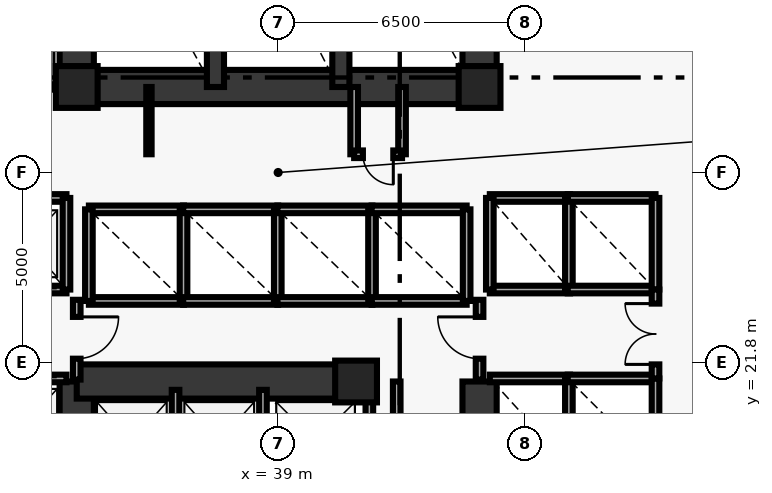
"""IFC4 building model, lengths in metres.
Left out: names, types, materials, properties, quantities, classifications, styles, units other than length and angle.
Written with IfcOpenShell. Run it as: python <this file> out.ifc"""

import sys

from ifc_helpers import new_model, si_unit, direction, frame, frame_2d, origin, origin_2d, place, context, subcontext, project, spatial, rectangle, extrude, element, fill, save


model = new_model("IFC4")
c1 = context("Model", 3, precision=1e-05, world=origin(), true_north=direction((0.0, 1.0)))
c2 = subcontext(c1, "Body", "Model", "MODEL_VIEW")
j1 = project(units=[si_unit("LENGTHUNIT", "METRE"), si_unit("PLANEANGLEUNIT", "RADIAN")], contexts=[c1])
p1 = place(None, origin())
s1 = spatial("IfcSite", under=j1, at=p1, CompositionType="ELEMENT")
p2 = place(p1, origin())
s2 = spatial("IfcBuilding", under=s1, at=p2, CompositionType="ELEMENT")
p3 = place(p2, frame((0.0, 0.0, 11.0)))
s3 = spatial("IfcBuildingStorey", under=s2, at=p3, CompositionType="ELEMENT", Elevation=11.0)
for number, where, z_axis, x_axis in (
    (1, (41.05, 21.3, 0.0), (0.0, 0.0, 1.0), (1.0, 0.0, 0.0)),
    (2, (44.3, 29.05, 0.0), (0.0, 0.0, 1.0), (1.0, 0.0, 0.0)),
    (3, (33.7, 29.05, 0.0), (0.0, 0.0, 1.0), (1.0, 0.0, 0.0)),
):
    element("IfcColumn", number, at=place(p3, frame(where, z_axis=z_axis, x_axis=x_axis)), inside=s3, PredefinedType="PILASTER", context=c2, shape_type="SweptSolid", body=[
        extrude(rectangle(XDim=1.1, YDim=1.1, at=origin_2d()), origin(), (0.0, 0.0, 1.0), 4.7),
    ])
p4 = place(p3, frame((33.7, 29.05, 0.0), z_axis=(0.0, 0.0, 1.0), x_axis=(0.0, 1.0, 0.0)))
e4 = element("IfcWall", 4, at=p4, inside=s3, PredefinedType="SHEAR", context=c2, shape_type="SweptSolid", body=[
    extrude(rectangle(XDim=8.35, YDim=0.9, at=frame_2d((4.175, 0.0))), origin(), (0.0, 0.0, 1.0), 4.7),
])
p5 = place(p3, frame((33.7, 18.35, 0.0), z_axis=(0.0, 0.0, 1.0), x_axis=(0.0, 1.0, 0.0)))
e5 = element("IfcWall", 5, at=p5, inside=s3, PredefinedType="SHEAR", context=c2, shape_type="SweptSolid", body=[
    extrude(rectangle(XDim=2.95, YDim=0.9, at=frame_2d((1.475, 0.0))), origin(), (0.0, 0.0, 1.0), 4.7),
])
p6 = place(p3, frame((44.3, 29.05, 0.0), z_axis=(0.0, 0.0, 1.0), x_axis=(0.0, 1.0, 0.0)))
e6 = element("IfcWall", 6, at=p6, inside=s3, PredefinedType="SHEAR", context=c2, shape_type="SweptSolid", body=[
    extrude(rectangle(XDim=8.35, YDim=0.9, at=frame_2d((4.175, 0.0))), origin(), (0.0, 0.0, 1.0), 4.7),
])
p7 = place(p3, frame((44.3, 18.35, 0.0), z_axis=(0.0, 0.0, 1.0), x_axis=(0.0, 1.0, 0.0)))
e7 = element("IfcWall", 7, at=p7, inside=s3, PredefinedType="SHEAR", context=c2, shape_type="SweptSolid", body=[
    extrude(rectangle(XDim=2.95, YDim=0.9, at=frame_2d((1.475, 0.0))), origin(), (0.0, 0.0, 1.0), 4.7),
])
p8 = place(p3, frame((33.7, 29.05, 0.0), z_axis=(0.0, 0.0, 1.0), x_axis=(1.0, 0.0, 0.0)))
e8 = element("IfcWall", 8, at=p8, inside=s3, PredefinedType="SHEAR", context=c2, shape_type="SweptSolid", body=[
    extrude(rectangle(XDim=10.6, YDim=0.9, at=frame_2d((5.3, 0.0))), origin(), (0.0, 0.0, 1.0), 4.7),
])
p9 = place(p3, frame((33.7, 21.3, 0.0), z_axis=(0.0, 0.0, 1.0), x_axis=(1.0, 0.0, 0.0)))
e9 = element("IfcWall", 9, at=p9, inside=s3, PredefinedType="SHEAR", context=c2, shape_type="SweptSolid", body=[
    extrude(rectangle(XDim=7.55, YDim=0.9, at=frame_2d((3.775, 0.0))), origin(), (0.0, 0.0, 1.0), 4.7),
])
for number, where, z_axis, x_axis in (
    (10, (37.35, 29.05, 0.0), (0.0, 0.0, 1.0), (0.0, 1.0, 0.0)),
    (11, (40.65, 29.05, 0.0), (0.0, 0.0, 1.0), (0.0, 1.0, 0.0)),
):
    element("IfcWall", number, at=place(p3, frame(where, z_axis=z_axis, x_axis=x_axis)), inside=s3, PredefinedType="SHEAR", context=c2, shape_type="SweptSolid", body=[
        extrude(rectangle(XDim=8.35, YDim=0.45, at=frame_2d((4.175, 0.0))), origin(), (0.0, 0.0, 1.0), 4.7),
    ])
p10 = place(p3, frame((35.6, 27.28, 0.0), z_axis=(0.0, 0.0, 1.0), x_axis=(0.0, 1.0, 0.0)))
e12 = element("IfcWall", 12, at=p10, inside=s3, PredefinedType="PARTITIONING", context=c2, shape_type="SweptSolid", body=[
    extrude(rectangle(XDim=1.77, YDim=0.14, at=frame_2d((0.885, 0.0))), origin(), (0.0, 0.0, 1.0), 4.7),
])
for number, where, z_axis, x_axis in (
    (13, (41.0, 27.28, 0.0), (0.0, 0.0, 1.0), (0.0, 1.0, 0.0)),
    (14, (42.26, 27.28, 0.0), (0.0, 0.0, 1.0), (0.0, 1.0, 0.0)),
):
    element("IfcWall", number, at=place(p3, frame(where, z_axis=z_axis, x_axis=x_axis)), inside=s3, PredefinedType="SOLIDWALL", context=c2, shape_type="SweptSolid", body=[
        extrude(rectangle(XDim=1.77, YDim=0.2, at=frame_2d((0.885, 0.0))), origin(), (0.0, 0.0, 1.0), 4.7),
    ])
p11 = place(p3, frame((41.0, 27.28, 0.0), z_axis=(0.0, 0.0, 1.0), x_axis=(1.0, 0.0, 0.0)))
e15 = element("IfcWall", 15, at=p11, inside=s3, PredefinedType="SOLIDWALL", context=c2, shape_type="SweptSolid", body=[
    extrude(rectangle(XDim=1.26, YDim=0.2, at=frame_2d((0.63, 0.0))), origin(), (0.0, 0.0, 1.0), 4.7),
])
p12 = place(p11, frame((0.23, 0.0, 0.0)))
e16 = element("IfcOpeningElement", 16, at=p12, cuts=e15, PredefinedType="OPENING", context=c2, shape_type="SweptSolid", body=[
    extrude(rectangle(XDim=0.8, YDim=2.05, at=frame_2d((0.4, 1.025))), frame((0.0, 0.11, 0.0), z_axis=(0.0, -1.0, 0.0), x_axis=(1.0, 0.0, 0.0)), (0.0, 0.0, 1.0), 0.22),
])
p13 = place(p3, frame((31.32, 23.72, 0.0), z_axis=(0.0, 0.0, 1.0), x_axis=(1.0, 0.0, 0.0)))
e17 = element("IfcWall", 17, at=p13, inside=s3, PredefinedType="SOLIDWALL", context=c2, shape_type="SweptSolid", body=[
    extrude(rectangle(XDim=2.11, YDim=0.2, at=frame_2d((1.055, 0.0))), origin(), (0.0, 0.0, 1.0), 4.7),
])
p14 = place(p13, frame((0.505, 0.0, 0.0)))
e18 = element("IfcOpeningElement", 18, at=p14, cuts=e17, PredefinedType="OPENING", context=c2, shape_type="SweptSolid", body=[
    extrude(rectangle(XDim=1.1, YDim=2.15, at=frame_2d((0.55, 1.075))), frame((0.0, 0.11, 0.0), z_axis=(0.0, -1.0, 0.0), x_axis=(1.0, 0.0, 0.0)), (0.0, 0.0, 1.0), 0.22),
])
p15 = place(p3, frame((31.32, 26.13, 0.0), z_axis=(0.0, 0.0, 1.0), x_axis=(1.0, 0.0, 0.0)))
e19 = element("IfcWall", 19, at=p15, inside=s3, PredefinedType="SOLIDWALL", context=c2, shape_type="SweptSolid", body=[
    extrude(rectangle(XDim=2.11, YDim=0.2, at=frame_2d((1.055, 0.0))), origin(), (0.0, 0.0, 1.0), 4.7),
])
p16 = place(p3, frame((33.43, 23.72, 0.0), z_axis=(0.0, 0.0, 1.0), x_axis=(0.0, 1.0, 0.0)))
e20 = element("IfcWall", 20, at=p16, inside=s3, PredefinedType="SOLIDWALL", context=c2, shape_type="SweptSolid", body=[
    extrude(rectangle(XDim=2.41, YDim=0.2, at=frame_2d((1.205, 0.0))), origin(), (0.0, 0.0, 1.0), 4.7),
])
p17 = place(p3, frame((31.32, 21.38, 0.0), z_axis=(0.0, 0.0, 1.0), x_axis=(1.0, 0.0, 0.0)))
e21 = element("IfcWall", 21, at=p17, inside=s3, PredefinedType="SOLIDWALL", context=c2, shape_type="SweptSolid", body=[
    extrude(rectangle(XDim=2.11, YDim=0.2, at=frame_2d((1.055, 0.0))), origin(), (0.0, 0.0, 1.0), 4.7),
])
p18 = place(p17, frame((0.505, 0.0, 0.0)))
e22 = element("IfcOpeningElement", 22, at=p18, cuts=e21, PredefinedType="OPENING", context=c2, shape_type="SweptSolid", body=[
    extrude(rectangle(XDim=1.1, YDim=2.15, at=frame_2d((0.55, 1.075))), frame((0.0, 0.11, 0.0), z_axis=(0.0, -1.0, 0.0), x_axis=(1.0, 0.0, 0.0)), (0.0, 0.0, 1.0), 0.22),
])
for number, where, z_axis, x_axis in (
    (23, (44.57, 23.72, 0.0), (0.0, 0.0, 1.0), (1.0, 0.0, 0.0)),
    (24, (44.57, 26.13, 0.0), (0.0, 0.0, 1.0), (1.0, 0.0, 0.0)),
):
    element("IfcWall", number, at=place(p3, frame(where, z_axis=z_axis, x_axis=x_axis)), inside=s3, PredefinedType="SOLIDWALL", context=c2, shape_type="SweptSolid", body=[
        extrude(rectangle(XDim=2.11, YDim=0.2, at=frame_2d((1.055, 0.0))), origin(), (0.0, 0.0, 1.0), 4.7),
    ])
for number, where, z_axis, x_axis in (
    (25, (44.57, 23.72, 0.0), (0.0, 0.0, 1.0), (0.0, 1.0, 0.0)),
    (26, (46.65, 23.72, 0.0), (0.0, 0.0, 1.0), (0.0, 1.0, 0.0)),
):
    element("IfcWall", number, at=place(p3, frame(where, z_axis=z_axis, x_axis=x_axis)), inside=s3, PredefinedType="SOLIDWALL", context=c2, shape_type="SweptSolid", body=[
        extrude(rectangle(XDim=2.41, YDim=0.2, at=frame_2d((1.205, 0.0))), origin(), (0.0, 0.0, 1.0), 4.7),
    ])
for number, where, z_axis, x_axis in (
    (27, (46.62, 23.72, 0.0), (0.0, 0.0, 1.0), (1.0, 0.0, 0.0)),
    (28, (46.62, 26.13, 0.0), (0.0, 0.0, 1.0), (1.0, 0.0, 0.0)),
):
    element("IfcWall", number, at=place(p3, frame(where, z_axis=z_axis, x_axis=x_axis)), inside=s3, PredefinedType="SOLIDWALL", context=c2, shape_type="SweptSolid", body=[
        extrude(rectangle(XDim=2.31, YDim=0.2, at=frame_2d((1.155, 0.0))), origin(), (0.0, 0.0, 1.0), 4.7),
    ])
p19 = place(p3, frame((48.93, 23.72, 0.0), z_axis=(0.0, 0.0, 1.0), x_axis=(0.0, 1.0, 0.0)))
e29 = element("IfcWall", 29, at=p19, inside=s3, PredefinedType="SOLIDWALL", context=c2, shape_type="SweptSolid", body=[
    extrude(rectangle(XDim=2.41, YDim=0.2, at=frame_2d((1.205, 0.0))), origin(), (0.0, 0.0, 1.0), 4.7),
])
p20 = place(p3, frame((44.57, 21.38, 0.0), z_axis=(0.0, 0.0, 1.0), x_axis=(1.0, 0.0, 0.0)))
e30 = element("IfcWall", 30, at=p20, inside=s3, PredefinedType="SOLIDWALL", context=c2, shape_type="SweptSolid", body=[
    extrude(rectangle(XDim=2.11, YDim=0.2, at=frame_2d((1.055, 0.0))), origin(), (0.0, 0.0, 1.0), 4.7),
])
for number, where, z_axis, x_axis in (
    (31, (46.65, 19.07, 0.0), (0.0, 0.0, 1.0), (0.0, 1.0, 0.0)),
    (32, (46.62, 21.38, 0.0), (0.0, 0.0, 1.0), (1.0, 0.0, 0.0)),
    (33, (48.93, 19.07, 0.0), (0.0, 0.0, 1.0), (0.0, 1.0, 0.0)),
):
    element("IfcWall", number, at=place(p3, frame(where, z_axis=z_axis, x_axis=x_axis)), inside=s3, PredefinedType="SOLIDWALL", context=c2, shape_type="SweptSolid", body=[
        extrude(rectangle(XDim=2.31, YDim=0.2, at=frame_2d((1.155, 0.0))), origin(), (0.0, 0.0, 1.0), 4.7),
    ])
for number, where, z_axis, x_axis in (
    (34, (34.02, 23.42, 0.0), (0.0, 0.0, 1.0), (1.0, 0.0, 0.0)),
    (35, (34.02, 25.83, 0.0), (0.0, 0.0, 1.0), (1.0, 0.0, 0.0)),
):
    element("IfcWall", number, at=place(p3, frame(where, z_axis=z_axis, x_axis=x_axis)), inside=s3, PredefinedType="SOLIDWALL", context=c2, shape_type="SweptSolid", body=[
        extrude(rectangle(XDim=2.5, YDim=0.2, at=frame_2d((1.25, 0.0))), origin(), (0.0, 0.0, 1.0), 4.7),
    ])
for number, where, z_axis, x_axis in (
    (36, (34.02, 23.42, 0.0), (0.0, 0.0, 1.0), (0.0, 1.0, 0.0)),
    (37, (36.51, 23.42, 0.0), (0.0, 0.0, 1.0), (0.0, 1.0, 0.0)),
):
    element("IfcWall", number, at=place(p3, frame(where, z_axis=z_axis, x_axis=x_axis)), inside=s3, PredefinedType="SOLIDWALL", context=c2, shape_type="SweptSolid", body=[
        extrude(rectangle(XDim=2.41, YDim=0.2, at=frame_2d((1.205, 0.0))), origin(), (0.0, 0.0, 1.0), 4.7),
    ])
for number, where, z_axis, x_axis in (
    (38, (36.5, 23.42, 0.0), (0.0, 0.0, 1.0), (1.0, 0.0, 0.0)),
    (39, (36.5, 25.83, 0.0), (0.0, 0.0, 1.0), (1.0, 0.0, 0.0)),
):
    element("IfcWall", number, at=place(p3, frame(where, z_axis=z_axis, x_axis=x_axis)), inside=s3, PredefinedType="SOLIDWALL", context=c2, shape_type="SweptSolid", body=[
        extrude(rectangle(XDim=2.5, YDim=0.2, at=frame_2d((1.25, 0.0))), origin(), (0.0, 0.0, 1.0), 4.7),
    ])
p21 = place(p3, frame((38.99, 23.42, 0.0), z_axis=(0.0, 0.0, 1.0), x_axis=(0.0, 1.0, 0.0)))
e40 = element("IfcWall", 40, at=p21, inside=s3, PredefinedType="SOLIDWALL", context=c2, shape_type="SweptSolid", body=[
    extrude(rectangle(XDim=2.41, YDim=0.2, at=frame_2d((1.205, 0.0))), origin(), (0.0, 0.0, 1.0), 4.7),
])
for number, where, z_axis, x_axis in (
    (41, (38.98, 23.42, 0.0), (0.0, 0.0, 1.0), (1.0, 0.0, 0.0)),
    (42, (38.98, 25.83, 0.0), (0.0, 0.0, 1.0), (1.0, 0.0, 0.0)),
):
    element("IfcWall", number, at=place(p3, frame(where, z_axis=z_axis, x_axis=x_axis)), inside=s3, PredefinedType="SOLIDWALL", context=c2, shape_type="SweptSolid", body=[
        extrude(rectangle(XDim=2.5, YDim=0.2, at=frame_2d((1.25, 0.0))), origin(), (0.0, 0.0, 1.0), 4.7),
    ])
p22 = place(p3, frame((41.47, 23.42, 0.0), z_axis=(0.0, 0.0, 1.0), x_axis=(0.0, 1.0, 0.0)))
e43 = element("IfcWall", 43, at=p22, inside=s3, PredefinedType="SOLIDWALL", context=c2, shape_type="SweptSolid", body=[
    extrude(rectangle(XDim=2.41, YDim=0.2, at=frame_2d((1.205, 0.0))), origin(), (0.0, 0.0, 1.0), 4.7),
])
for number, where, z_axis, x_axis in (
    (44, (41.46, 23.42, 0.0), (0.0, 0.0, 1.0), (1.0, 0.0, 0.0)),
    (45, (41.46, 25.83, 0.0), (0.0, 0.0, 1.0), (1.0, 0.0, 0.0)),
):
    element("IfcWall", number, at=place(p3, frame(where, z_axis=z_axis, x_axis=x_axis)), inside=s3, PredefinedType="SOLIDWALL", context=c2, shape_type="SweptSolid", body=[
        extrude(rectangle(XDim=2.5, YDim=0.2, at=frame_2d((1.25, 0.0))), origin(), (0.0, 0.0, 1.0), 4.7),
    ])
p23 = place(p3, frame((43.96, 23.42, 0.0), z_axis=(0.0, 0.0, 1.0), x_axis=(0.0, 1.0, 0.0)))
e46 = element("IfcWall", 46, at=p23, inside=s3, PredefinedType="SOLIDWALL", context=c2, shape_type="SweptSolid", body=[
    extrude(rectangle(XDim=2.41, YDim=0.2, at=frame_2d((1.205, 0.0))), origin(), (0.0, 0.0, 1.0), 4.7),
])
for number, where, z_axis, x_axis in (
    (47, (36.3, 18.37, 0.0), (0.0, 0.0, 1.0), (0.0, 1.0, 0.0)),
    (48, (38.6, 18.37, 0.0), (0.0, 0.0, 1.0), (0.0, 1.0, 0.0)),
    (49, (41.4, 18.37, 0.0), (0.0, 0.0, 1.0), (0.0, 1.0, 0.0)),
):
    element("IfcWall", number, at=place(p3, frame(where, z_axis=z_axis, x_axis=x_axis)), inside=s3, PredefinedType="SOLIDWALL", context=c2, shape_type="SweptSolid", body=[
        extrude(rectangle(XDim=2.71, YDim=0.2, at=frame_2d((1.355, 0.0))), origin(), (0.0, 0.0, 1.0), 4.7),
    ])
p24 = place(p3, frame((48.93, 21.38, 0.0), z_axis=(0.0, 0.0, 1.0), x_axis=(0.0, 1.0, 0.0)))
e50 = element("IfcWall", 50, at=p24, inside=s3, PredefinedType="SOLIDWALL", context=c2, shape_type="SweptSolid", body=[
    extrude(rectangle(XDim=2.34, YDim=0.2, at=frame_2d((1.17, 0.0))), origin(), (0.0, 0.0, 1.0), 4.7),
])
p25 = place(p24, frame((0.37, 0.0, 0.0)))
e51 = element("IfcOpeningElement", 51, at=p25, cuts=e50, PredefinedType="OPENING", context=c2, shape_type="SweptSolid", body=[
    extrude(rectangle(XDim=1.6, YDim=2.2, at=frame_2d((0.8, 1.1))), frame((0.0, 0.11, 0.0), z_axis=(0.0, -1.0, 0.0), x_axis=(1.0, 0.0, 0.0)), (0.0, 0.0, 1.0), 0.22),
])
p26 = place(p3, frame((33.7, 21.35, 0.0), z_axis=(0.0, 0.0, 1.0), x_axis=(0.0, 1.0, 0.0)))
e52 = element("IfcWall", 52, at=p26, inside=s3, PredefinedType="SOLIDWALL", context=c2, shape_type="SweptSolid", body=[
    extrude(rectangle(XDim=2.1, YDim=0.2, at=frame_2d((1.05, 0.0))), origin(), (0.0, 0.0, 1.0), 3.92),
])
p27 = place(p26, frame((0.55, 0.0, 0.0)))
e53 = element("IfcOpeningElement", 53, at=p27, cuts=e52, PredefinedType="OPENING", context=c2, shape_type="SweptSolid", body=[
    extrude(rectangle(XDim=1.1, YDim=2.15, at=frame_2d((0.55, 1.075))), frame((0.0, 0.11, 0.0), z_axis=(0.0, -1.0, 0.0), x_axis=(1.0, 0.0, 0.0)), (0.0, 0.0, 1.0), 0.22),
])
p28 = place(p3, frame((44.3, 21.35, 0.0), z_axis=(0.0, 0.0, 1.0), x_axis=(0.0, 1.0, 0.0)))
e54 = element("IfcWall", 54, at=p28, inside=s3, PredefinedType="SOLIDWALL", context=c2, shape_type="SweptSolid", body=[
    extrude(rectangle(XDim=2.1, YDim=0.2, at=frame_2d((1.05, 0.0))), origin(), (0.0, 0.0, 1.0), 3.92),
])
p29 = place(p28, frame((0.55, 0.0, 0.0)))
e55 = element("IfcOpeningElement", 55, at=p29, cuts=e54, PredefinedType="OPENING", context=c2, shape_type="SweptSolid", body=[
    extrude(rectangle(XDim=1.1, YDim=2.15, at=frame_2d((0.55, 1.075))), frame((0.0, 0.11, 0.0), z_axis=(0.0, -1.0, 0.0), x_axis=(1.0, 0.0, 0.0)), (0.0, 0.0, 1.0), 0.22),
])
p30 = place(p3, frame((42.12, 18.35, 0.0), z_axis=(0.0, 0.0, 1.0), x_axis=(0.0, 1.0, 0.0)))
e56 = element("IfcWall", 56, at=p30, inside=s3, PredefinedType="SOLIDWALL", context=c2, shape_type="SweptSolid", body=[
    extrude(rectangle(XDim=2.95, YDim=0.2, at=frame_2d((1.475, 0.0))), origin(), (0.0, 0.0, 1.0), 4.7),
])
p31 = place(p30, frame((0.2, 0.0, 0.0)))
e57 = element("IfcOpeningElement", 57, at=p31, cuts=e56, PredefinedType="OPENING", context=c2, shape_type="SweptSolid", body=[
    extrude(rectangle(XDim=0.8, YDim=2.05, at=frame_2d((0.4, 1.025))), frame((0.0, 0.11, 0.0), z_axis=(0.0, -1.0, 0.0), x_axis=(1.0, 0.0, 0.0)), (0.0, 0.0, 1.0), 0.22),
])
p32 = place(p3, frame((30.85, 29.05, 0.0), z_axis=(0.0, 0.0, 1.0), x_axis=(1.0, 0.0, 0.0)))
e58 = element("IfcWall", 58, at=p32, inside=s3, PredefinedType="PARTITIONING", context=c2, shape_type="SweptSolid", body=[
    extrude(rectangle(XDim=2.43, YDim=0.14, at=frame_2d((1.215, 0.0))), origin(), (0.0, 0.0, 1.0), 3.66),
])
p33 = place(p32, frame((0.14, 0.0, 0.0)))
e59 = element("IfcOpeningElement", 59, at=p33, cuts=e58, PredefinedType="OPENING", context=c2, shape_type="SweptSolid", body=[
    extrude(rectangle(XDim=0.85, YDim=2.1, at=frame_2d((0.425, 1.05))), frame((0.0, 0.08, 0.0), z_axis=(0.0, -1.0, 0.0), x_axis=(1.0, 0.0, 0.0)), (0.0, 0.0, 1.0), 0.16),
])
p34 = place(p32, frame((1.3, 0.0, 0.0)))
e60 = element("IfcOpeningElement", 60, at=p34, cuts=e58, PredefinedType="OPENING", context=c2, shape_type="SweptSolid", body=[
    extrude(rectangle(XDim=0.95, YDim=2.1, at=frame_2d((0.475, 1.05))), frame((0.0, 0.08, 0.0), z_axis=(0.0, -1.0, 0.0), x_axis=(1.0, 0.0, 0.0)), (0.0, 0.0, 1.0), 0.16),
])
p35 = place(p12, origin())
e61 = element("IfcDoor", 61, at=p35, inside=s3, OperationType="SINGLE_SWING_RIGHT", PredefinedType="DOOR", context=c2, shape_type="SweptSolid", body=[
    extrude(rectangle(XDim=0.8, YDim=2.05, at=frame_2d((0.4, 1.025))), frame((0.0, 0.025, 0.0), z_axis=(0.0, -1.0, 0.0), x_axis=(1.0, 0.0, 0.0)), (0.0, 0.0, 1.0), 0.05),
])
fill(e16, e61)
p36 = place(p25, origin())
e62 = element("IfcDoor", 62, at=p36, inside=s3, OperationType="DOUBLE_DOOR_SINGLE_SWING", PredefinedType="DOOR", context=c2, shape_type="SweptSolid", body=[
    extrude(rectangle(XDim=1.6, YDim=2.2, at=frame_2d((0.8, 1.1))), frame((0.0, 0.025, 0.0), z_axis=(0.0, -1.0, 0.0), x_axis=(1.0, 0.0, 0.0)), (0.0, 0.0, 1.0), 0.05),
])
fill(e51, e62)
p37 = place(p27, origin())
e63 = element("IfcDoor", 63, at=p37, inside=s3, OperationType="SINGLE_SWING_RIGHT", PredefinedType="DOOR", context=c2, shape_type="SweptSolid", body=[
    extrude(rectangle(XDim=1.1, YDim=2.15, at=frame_2d((0.55, 1.075))), frame((0.0, 0.025, 0.0), z_axis=(0.0, -1.0, 0.0), x_axis=(1.0, 0.0, 0.0)), (0.0, 0.0, 1.0), 0.05),
])
fill(e53, e63)
p38 = place(p29, origin())
e64 = element("IfcDoor", 64, at=p38, inside=s3, OperationType="SINGLE_SWING_RIGHT", PredefinedType="DOOR", context=c2, shape_type="SweptSolid", body=[
    extrude(rectangle(XDim=1.1, YDim=2.15, at=frame_2d((0.55, 1.075))), frame((0.0, 0.025, 0.0), z_axis=(0.0, -1.0, 0.0), x_axis=(1.0, 0.0, 0.0)), (0.0, 0.0, 1.0), 0.05),
])
fill(e55, e64)
p39 = place(p34, origin())
e65 = element("IfcDoor", 65, at=p39, inside=s3, OperationType="SINGLE_SWING_RIGHT", PredefinedType="DOOR", context=c2, shape_type="SweptSolid", body=[
    extrude(rectangle(XDim=0.95, YDim=2.1, at=frame_2d((0.475, 1.05))), frame((0.0, 0.025, 0.0), z_axis=(0.0, -1.0, 0.0), x_axis=(1.0, 0.0, 0.0)), (0.0, 0.0, 1.0), 0.05),
])
fill(e60, e65)
save(model, sys.argv[1])
